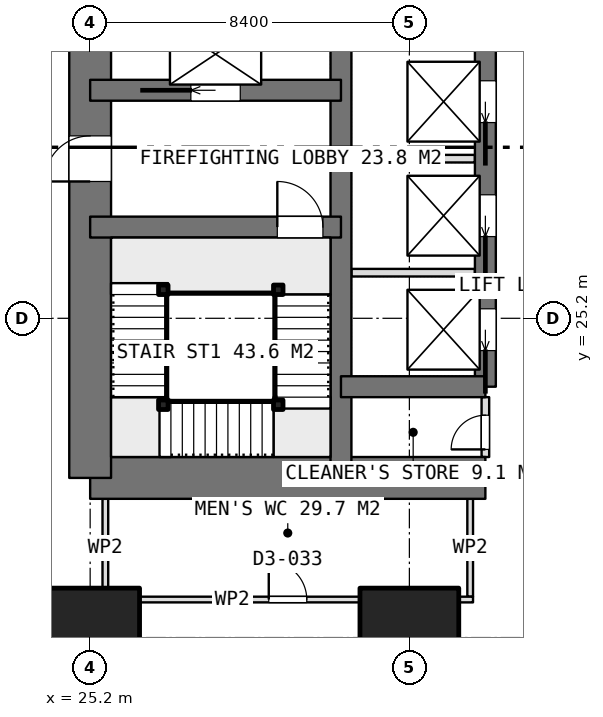
"""IFC4 building model, lengths in metres.
Left out: names, types, materials, properties, quantities, classifications, styles, units other than length and angle.
Written with IfcOpenShell. Run it as: python <this file> out.ifc"""

import sys

from ifc_helpers import new_model, si_unit, direction, frame, frame_2d, origin, origin_2d, place, context, subcontext, project, spatial, rectangle, extrude, element, fill, save


model = new_model("IFC4")
c1 = context("Model", 3, precision=1e-05, world=origin(), true_north=direction((0.0, 1.0)))
c2 = subcontext(c1, "Body", "Model", "MODEL_VIEW")
j1 = project(units=[si_unit("LENGTHUNIT", "METRE"), si_unit("PLANEANGLEUNIT", "RADIAN")], contexts=[c1])
p1 = place(None, origin())
s1 = spatial("IfcSite", under=j1, at=p1, CompositionType="ELEMENT")
p2 = place(p1, origin())
s2 = spatial("IfcBuilding", under=s1, at=p2, CompositionType="ELEMENT")
p3 = place(p2, frame((0.0, 0.0, 29.15)))
s3 = spatial("IfcBuildingStorey", under=s2, at=p3, CompositionType="ELEMENT", Elevation=29.15)
p4 = place(p3, frame((25.2, 21.0, 0.0), z_axis=(0.0, 0.0, 1.0), x_axis=(1.0, 0.0, 0.0)))
e1 = element("IfcWall", 1, at=p4, inside=s3, PredefinedType="SHEAR", context=c2, shape_type="SweptSolid", body=[
    extrude(rectangle(XDim=10.4, YDim=1.1, at=frame_2d((5.2, 0.0))), origin(), (0.0, 0.0, 1.0), 3.75),
])
p5 = place(p3, frame((25.2, 21.0, 0.0), z_axis=(0.0, 0.0, 1.0), x_axis=(0.0, 1.0, 0.0)))
e2 = element("IfcWall", 2, at=p5, inside=s3, PredefinedType="SHEAR", context=c2, shape_type="SweptSolid", body=[
    extrude(rectangle(XDim=25.2, YDim=1.1, at=frame_2d((12.6, 0.0))), origin(), (0.0, 0.0, 1.0), 3.75),
])
p6 = place(p5, frame((7.8, 0.0, 0.0)))
e3 = element("IfcOpeningElement", 3, at=p6, cuts=e2, PredefinedType="OPENING", context=c2, shape_type="SweptSolid", body=[
    extrude(rectangle(XDim=1.2, YDim=2.1, at=frame_2d((0.6, 1.05))), frame((0.0, 0.56, 0.0), z_axis=(0.0, -1.0, 0.0), x_axis=(1.0, 0.0, 0.0)), (0.0, 0.0, 1.0), 1.12),
])
p7 = place(p5, frame((14.25, 0.0, 0.0)))
e4 = element("IfcOpeningElement", 4, at=p7, cuts=e2, PredefinedType="OPENING", context=c2, shape_type="SweptSolid", body=[
    extrude(rectangle(XDim=0.9, YDim=2.1, at=frame_2d((0.45, 1.05))), frame((0.0, 0.56, 0.0), z_axis=(0.0, -1.0, 0.0), x_axis=(1.0, 0.0, 0.0)), (0.0, 0.0, 1.0), 1.12),
])
p8 = place(p5, frame((16.85, 0.0, 0.0)))
e5 = element("IfcOpeningElement", 5, at=p8, cuts=e2, PredefinedType="OPENING", context=c2, shape_type="SweptSolid", body=[
    extrude(rectangle(XDim=0.9, YDim=2.1, at=frame_2d((0.45, 1.05))), frame((0.0, 0.56, 0.0), z_axis=(0.0, -1.0, 0.0), x_axis=(1.0, 0.0, 0.0)), (0.0, 0.0, 1.0), 1.12),
])
p9 = place(p5, frame((19.075, 0.0, 0.0)))
e6 = element("IfcOpeningElement", 6, at=p9, cuts=e2, PredefinedType="OPENING", context=c2, shape_type="SweptSolid", body=[
    extrude(rectangle(XDim=1.2, YDim=2.1, at=frame_2d((0.6, 1.05))), frame((0.0, 0.56, 0.0), z_axis=(0.0, -1.0, 0.0), x_axis=(1.0, 0.0, 0.0)), (0.0, 0.0, 1.0), 1.12),
])
p10 = place(p3, frame((31.8, 21.0, 0.0), z_axis=(0.0, 0.0, 1.0), x_axis=(0.0, 1.0, 0.0)))
e7 = element("IfcWall", 7, at=p10, inside=s3, PredefinedType="SHEAR", context=c2, shape_type="SweptSolid", body=[
    extrude(rectangle(XDim=25.2, YDim=0.55, at=frame_2d((12.6, 0.0))), origin(), (0.0, 0.0, 1.0), 3.75),
])
p11 = place(p3, frame((35.6, 23.4, 0.0), z_axis=(0.0, 0.0, 1.0), x_axis=(0.0, 1.0, 0.0)))
e8 = element("IfcWall", 8, at=p11, inside=s3, PredefinedType="SHEAR", context=c2, shape_type="SweptSolid", body=[
    extrude(rectangle(XDim=18.0, YDim=0.55, at=frame_2d((9.0, 0.0))), origin(), (0.0, 0.0, 1.0), 3.75),
])
p12 = place(p11, frame((0.95, 0.0, 0.0)))
e9 = element("IfcOpeningElement", 9, at=p12, cuts=e8, PredefinedType="OPENING", context=c2, shape_type="SweptSolid", body=[
    extrude(rectangle(XDim=1.1, YDim=2.1, at=frame_2d((0.55, 1.05))), frame((0.0, 0.285, 0.0), z_axis=(0.0, -1.0, 0.0), x_axis=(1.0, 0.0, 0.0)), (0.0, 0.0, 1.0), 0.57),
])
p13 = place(p11, frame((3.95, 0.0, 0.0)))
e10 = element("IfcOpeningElement", 10, at=p13, cuts=e8, PredefinedType="OPENING", context=c2, shape_type="SweptSolid", body=[
    extrude(rectangle(XDim=1.1, YDim=2.1, at=frame_2d((0.55, 1.05))), frame((0.0, 0.285, 0.0), z_axis=(0.0, -1.0, 0.0), x_axis=(1.0, 0.0, 0.0)), (0.0, 0.0, 1.0), 0.57),
])
p14 = place(p11, frame((6.95, 0.0, 0.0)))
e11 = element("IfcOpeningElement", 11, at=p14, cuts=e8, PredefinedType="OPENING", context=c2, shape_type="SweptSolid", body=[
    extrude(rectangle(XDim=1.1, YDim=2.1, at=frame_2d((0.55, 1.05))), frame((0.0, 0.285, 0.0), z_axis=(0.0, -1.0, 0.0), x_axis=(1.0, 0.0, 0.0)), (0.0, 0.0, 1.0), 0.57),
])
p15 = place(p11, frame((9.95, 0.0, 0.0)))
e12 = element("IfcOpeningElement", 12, at=p15, cuts=e8, PredefinedType="OPENING", context=c2, shape_type="SweptSolid", body=[
    extrude(rectangle(XDim=1.1, YDim=2.1, at=frame_2d((0.55, 1.05))), frame((0.0, 0.285, 0.0), z_axis=(0.0, -1.0, 0.0), x_axis=(1.0, 0.0, 0.0)), (0.0, 0.0, 1.0), 0.57),
])
p16 = place(p11, frame((12.95, 0.0, 0.0)))
e13 = element("IfcOpeningElement", 13, at=p16, cuts=e8, PredefinedType="OPENING", context=c2, shape_type="SweptSolid", body=[
    extrude(rectangle(XDim=1.1, YDim=2.1, at=frame_2d((0.55, 1.05))), frame((0.0, 0.285, 0.0), z_axis=(0.0, -1.0, 0.0), x_axis=(1.0, 0.0, 0.0)), (0.0, 0.0, 1.0), 0.57),
])
p17 = place(p11, frame((15.95, 0.0, 0.0)))
e14 = element("IfcOpeningElement", 14, at=p17, cuts=e8, PredefinedType="OPENING", context=c2, shape_type="SweptSolid", body=[
    extrude(rectangle(XDim=1.1, YDim=2.1, at=frame_2d((0.55, 1.05))), frame((0.0, 0.285, 0.0), z_axis=(0.0, -1.0, 0.0), x_axis=(1.0, 0.0, 0.0)), (0.0, 0.0, 1.0), 0.57),
])
p18 = place(p3, frame((31.8, 23.4, 0.0), z_axis=(0.0, 0.0, 1.0), x_axis=(1.0, 0.0, 0.0)))
e15 = element("IfcWall", 15, at=p18, inside=s3, PredefinedType="SHEAR", context=c2, shape_type="SweptSolid", body=[
    extrude(rectangle(XDim=3.8, YDim=0.55, at=frame_2d((1.9, 0.0))), origin(), (0.0, 0.0, 1.0), 3.75),
])
p19 = place(p3, frame((25.2, 27.6, 0.0), z_axis=(0.0, 0.0, 1.0), x_axis=(1.0, 0.0, 0.0)))
e16 = element("IfcWall", 16, at=p19, inside=s3, PredefinedType="SHEAR", context=c2, shape_type="SweptSolid", body=[
    extrude(rectangle(XDim=6.6, YDim=0.55, at=frame_2d((3.3, 0.0))), origin(), (0.0, 0.0, 1.0), 3.75),
])
p20 = place(p19, frame((4.925, 0.0, 0.0)))
e17 = element("IfcOpeningElement", 17, at=p20, cuts=e16, PredefinedType="OPENING", context=c2, shape_type="SweptSolid", body=[
    extrude(rectangle(XDim=1.2, YDim=2.1, at=frame_2d((0.6, 1.05))), frame((0.0, 0.285, 0.0), z_axis=(0.0, -1.0, 0.0), x_axis=(1.0, 0.0, 0.0)), (0.0, 0.0, 1.0), 0.57),
])
p21 = place(p3, frame((25.2, 31.2, 0.0), z_axis=(0.0, 0.0, 1.0), x_axis=(1.0, 0.0, 0.0)))
e18 = element("IfcWall", 18, at=p21, inside=s3, PredefinedType="SHEAR", context=c2, shape_type="SweptSolid", body=[
    extrude(rectangle(XDim=6.6, YDim=0.55, at=frame_2d((3.3, 0.0))), origin(), (0.0, 0.0, 1.0), 3.75),
])
p22 = place(p21, frame((2.65, 0.0, 0.0)))
e19 = element("IfcOpeningElement", 19, at=p22, cuts=e18, PredefinedType="OPENING", context=c2, shape_type="SweptSolid", body=[
    extrude(rectangle(XDim=1.3, YDim=2.1, at=frame_2d((0.65, 1.05))), frame((0.0, 0.285, 0.0), z_axis=(0.0, -1.0, 0.0), x_axis=(1.0, 0.0, 0.0)), (0.0, 0.0, 1.0), 0.57),
])
for number, where, z_axis, x_axis in (
    (20, (25.2, 16.8, 0.0), (0.0, 0.0, 1.0), (1.0, 0.0, 0.0)),
    (21, (33.6, 16.8, 0.0), (0.0, 0.0, 1.0), (1.0, 0.0, 0.0)),
):
    element("IfcColumn", number, at=place(p3, frame(where, z_axis=z_axis, x_axis=x_axis)), inside=s3, PredefinedType="COLUMN", context=c2, shape_type="SweptSolid", body=[
        extrude(rectangle(XDim=2.6, YDim=2.6, at=origin_2d()), origin(), (0.0, 0.0, 1.0), 3.75),
    ])
for number, where, z_axis, x_axis in (
    (22, (32.075, 26.4, 0.0), (0.0, 0.0, 1.0), (1.0, 0.0, 0.0)),
    (23, (32.075, 29.4, 0.0), (0.0, 0.0, 1.0), (1.0, 0.0, 0.0)),
):
    element("IfcWall", number, at=place(p3, frame(where, z_axis=z_axis, x_axis=x_axis)), inside=s3, PredefinedType="PARTITIONING", context=c2, shape_type="SweptSolid", body=[
        extrude(rectangle(XDim=3.25, YDim=0.2, at=frame_2d((1.625, 0.0))), origin(), (0.0, 0.0, 1.0), 3.5),
    ])
p23 = place(p3, frame((35.6, 21.55, 0.0), z_axis=(0.0, 0.0, 1.0), x_axis=(0.0, 1.0, 0.0)))
e24 = element("IfcWall", 24, at=p23, inside=s3, PredefinedType="PARTITIONING", context=c2, shape_type="SweptSolid", body=[
    extrude(rectangle(XDim=1.575, YDim=0.2, at=frame_2d((0.788, 0.0))), origin(), (0.0, 0.0, 1.0), 3.5),
])
p24 = place(p23, frame((0.2, 0.0, 0.0)))
e25 = element("IfcOpeningElement", 25, at=p24, cuts=e24, PredefinedType="OPENING", context=c2, shape_type="SweptSolid", body=[
    extrude(rectangle(XDim=0.9, YDim=2.1, at=frame_2d((0.45, 1.05))), frame((0.0, 0.11, 0.0), z_axis=(0.0, -1.0, 0.0), x_axis=(1.0, 0.0, 0.0)), (0.0, 0.0, 1.0), 0.22),
])
p25 = place(p3, frame((25.525, 17.8, 0.0), z_axis=(0.0, 0.0, 1.0), x_axis=(1.0, 0.0, 0.0)))
e26 = element("IfcWall", 26, at=p25, inside=s3, PredefinedType="PARTITIONING", context=c2, shape_type="SweptSolid", body=[
    extrude(rectangle(XDim=9.75, YDim=0.15, at=frame_2d((4.875, 0.0))), origin(), (0.0, 0.0, 1.0), 3.5),
])
p26 = place(p25, frame((4.375, 0.0, 0.0)))
e27 = element("IfcOpeningElement", 27, at=p26, cuts=e26, PredefinedType="OPENING", context=c2, shape_type="SweptSolid", body=[
    extrude(rectangle(XDim=1.0, YDim=2.1, at=frame_2d((0.5, 1.05))), frame((0.0, 0.085, 0.0), z_axis=(0.0, -1.0, 0.0), x_axis=(1.0, 0.0, 0.0)), (0.0, 0.0, 1.0), 0.17),
])
for number, where, z_axis, x_axis in (
    (28, (25.6, 17.875, 0.0), (0.0, 0.0, 1.0), (0.0, 1.0, 0.0)),
    (29, (35.2, 17.875, 0.0), (0.0, 0.0, 1.0), (0.0, 1.0, 0.0)),
):
    element("IfcWall", number, at=place(p3, frame(where, z_axis=z_axis, x_axis=x_axis)), inside=s3, PredefinedType="PARTITIONING", context=c2, shape_type="SweptSolid", body=[
        extrude(rectangle(XDim=2.575, YDim=0.15, at=frame_2d((1.288, 0.0))), origin(), (0.0, 0.0, 1.0), 3.5),
    ])
for number, where, z_axis, x_axis in (
    (30, (30.15, 25.95, 0.0), (0.0, 0.0, 1.0), (1.0, 0.0, 0.0)),
    (31, (30.15, 22.925, 0.0), (0.0, 0.0, 1.0), (1.0, 0.0, 0.0)),
    (32, (27.125, 22.925, 0.0), (0.0, 0.0, 1.0), (1.0, 0.0, 0.0)),
    (33, (27.125, 25.95, 0.0), (0.0, 0.0, 1.0), (1.0, 0.0, 0.0)),
):
    element("IfcColumn", number, at=place(p3, frame(where, z_axis=z_axis, x_axis=x_axis)), inside=s3, PredefinedType="COLUMN", context=c2, shape_type="SweptSolid", body=[
        extrude(rectangle(XDim=0.25, YDim=0.25, at=origin_2d()), origin(), (0.0, 0.0, 1.0), 3.75),
    ])
p27 = place(p6, origin())
e34 = element("IfcDoor", 34, at=p27, inside=s3, OperationType="SINGLE_SWING_LEFT", PredefinedType="DOOR", context=c2, shape_type="SweptSolid", body=[
    extrude(rectangle(XDim=1.2, YDim=2.1, at=frame_2d((0.6, 1.05))), frame((0.0, 0.025, 0.0), z_axis=(0.0, -1.0, 0.0), x_axis=(1.0, 0.0, 0.0)), (0.0, 0.0, 1.0), 0.05),
])
fill(e3, e34)
p28 = place(p24, origin())
e35 = element("IfcDoor", 35, at=p28, inside=s3, OperationType="SINGLE_SWING_LEFT", PredefinedType="DOOR", context=c2, shape_type="SweptSolid", body=[
    extrude(rectangle(XDim=0.9, YDim=2.1, at=frame_2d((0.45, 1.05))), frame((0.0, 0.025, 0.0), z_axis=(0.0, -1.0, 0.0), x_axis=(1.0, 0.0, 0.0)), (0.0, 0.0, 1.0), 0.05),
])
fill(e25, e35)
p29 = place(p12, origin())
e36 = element("IfcDoor", 36, at=p29, inside=s3, OperationType="SLIDING_TO_LEFT", PredefinedType="USERDEFINED", context=c2, shape_type="SweptSolid", body=[
    extrude(rectangle(XDim=1.1, YDim=2.1, at=frame_2d((0.55, 1.05))), frame((0.0, 0.025, 0.0), z_axis=(0.0, -1.0, 0.0), x_axis=(1.0, 0.0, 0.0)), (0.0, 0.0, 1.0), 0.05),
])
fill(e9, e36)
p30 = place(p13, origin())
e37 = element("IfcDoor", 37, at=p30, inside=s3, OperationType="SLIDING_TO_LEFT", PredefinedType="USERDEFINED", context=c2, shape_type="SweptSolid", body=[
    extrude(rectangle(XDim=1.1, YDim=2.1, at=frame_2d((0.55, 1.05))), frame((0.0, 0.025, 0.0), z_axis=(0.0, -1.0, 0.0), x_axis=(1.0, 0.0, 0.0)), (0.0, 0.0, 1.0), 0.05),
])
fill(e10, e37)
p31 = place(p14, origin())
e38 = element("IfcDoor", 38, at=p31, inside=s3, OperationType="SLIDING_TO_LEFT", PredefinedType="USERDEFINED", context=c2, shape_type="SweptSolid", body=[
    extrude(rectangle(XDim=1.1, YDim=2.1, at=frame_2d((0.55, 1.05))), frame((0.0, 0.025, 0.0), z_axis=(0.0, -1.0, 0.0), x_axis=(1.0, 0.0, 0.0)), (0.0, 0.0, 1.0), 0.05),
])
fill(e11, e38)
p32 = place(p22, origin())
e39 = element("IfcDoor", 39, at=p32, inside=s3, OperationType="SLIDING_TO_LEFT", PredefinedType="USERDEFINED", context=c2, shape_type="SweptSolid", body=[
    extrude(rectangle(XDim=1.3, YDim=2.1, at=frame_2d((0.65, 1.05))), frame((0.0, 0.025, 0.0), z_axis=(0.0, -1.0, 0.0), x_axis=(1.0, 0.0, 0.0)), (0.0, 0.0, 1.0), 0.05),
])
fill(e19, e39)
p33 = place(p26, origin())
e40 = element("IfcDoor", 40, at=p33, inside=s3, OperationType="SINGLE_SWING_LEFT", PredefinedType="DOOR", context=c2, shape_type="SweptSolid", body=[
    extrude(rectangle(XDim=1.0, YDim=2.1, at=frame_2d((0.5, 1.05))), frame((0.0, 0.025, 0.0), z_axis=(0.0, -1.0, 0.0), x_axis=(1.0, 0.0, 0.0)), (0.0, 0.0, 1.0), 0.05),
])
fill(e27, e40)
p34 = place(p20, origin())
e41 = element("IfcDoor", 41, at=p34, inside=s3, OperationType="SINGLE_SWING_RIGHT", PredefinedType="DOOR", context=c2, shape_type="SweptSolid", body=[
    extrude(rectangle(XDim=1.2, YDim=2.1, at=frame_2d((0.6, 1.05))), frame((0.0, 0.025, 0.0), z_axis=(0.0, -1.0, 0.0), x_axis=(1.0, 0.0, 0.0)), (0.0, 0.0, 1.0), 0.05),
])
fill(e17, e41)
save(model, sys.argv[1])
